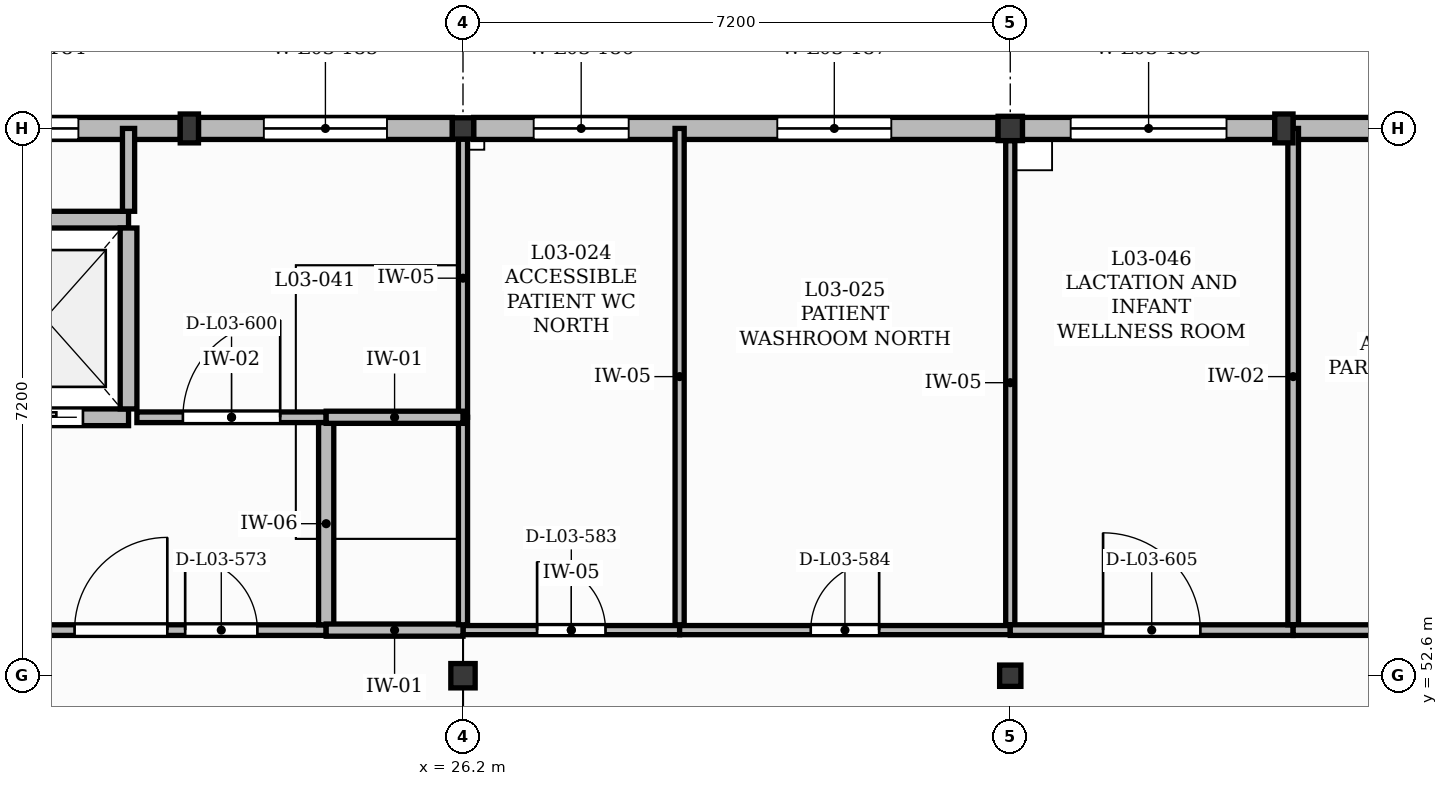
"""IFC4 building model, lengths in metres.
Left out: names, types, materials, properties, quantities, classifications, styles, units other than length and angle.
Written with IfcOpenShell. Run it as: python <this file> out.ifc"""

import sys

from ifc_helpers import new_model, si_unit, direction, frame, frame_2d, origin, origin_2d, place, context, subcontext, project, spatial, rectangle, extrude, element, fill, save


model = new_model("IFC4")
c1 = context("Model", 3, precision=1e-05, world=origin(), true_north=direction((0.0, 1.0)))
c2 = subcontext(c1, "Body", "Model", "MODEL_VIEW")
j1 = project(units=[si_unit("LENGTHUNIT", "METRE"), si_unit("PLANEANGLEUNIT", "RADIAN")], contexts=[c1])
p1 = place(None, origin())
s1 = spatial("IfcSite", under=j1, at=p1, CompositionType="ELEMENT")
p2 = place(p1, origin())
s2 = spatial("IfcBuilding", under=s1, at=p2, CompositionType="ELEMENT")
p3 = place(p2, frame((0.0, 0.0, 13.2)))
s3 = spatial("IfcBuildingStorey", under=s2, at=p3, CompositionType="ELEMENT", Elevation=13.2)
p4 = place(p3, frame((26.2, 52.6, 0.0), z_axis=(0.0, 0.0, 1.0), x_axis=(1.0, 0.0, 0.0)))
e1 = element("IfcColumn", 1, at=p4, inside=s3, PredefinedType="COLUMN", context=c2, shape_type="SweptSolid", body=[
    extrude(rectangle(XDim=0.32, YDim=0.32, at=origin_2d()), origin(), (0.0, 0.0, 1.0), 4.01),
])
for number, where, z_axis, x_axis in (
    (2, (26.2, 59.8, 0.0), (0.0, 0.0, 1.0), (1.0, 0.0, 0.0)),
    (3, (33.4, 52.6, 0.0), (0.0, 0.0, 1.0), (1.0, 0.0, 0.0)),
):
    element("IfcColumn", number, at=place(p3, frame(where, z_axis=z_axis, x_axis=x_axis)), inside=s3, PredefinedType="COLUMN", context=c2, shape_type="SweptSolid", body=[
        extrude(rectangle(XDim=0.28, YDim=0.28, at=origin_2d()), origin(), (0.0, 0.0, 1.0), 4.01),
    ])
p5 = place(p3, frame((33.4, 59.8, 0.0), z_axis=(0.0, 0.0, 1.0), x_axis=(1.0, 0.0, 0.0)))
e4 = element("IfcColumn", 4, at=p5, inside=s3, PredefinedType="COLUMN", context=c2, shape_type="SweptSolid", body=[
    extrude(rectangle(XDim=0.32, YDim=0.32, at=origin_2d()), origin(), (0.0, 0.0, 1.0), 4.01),
])
for number, where, z_axis, x_axis in (
    (5, (22.6, 59.8, 0.0), (0.0, 0.0, 1.0), (1.0, 0.0, 0.0)),
    (6, (37.0, 59.8, 0.0), (0.0, 0.0, 1.0), (1.0, 0.0, 0.0)),
):
    element("IfcColumn", number, at=place(p3, frame(where, z_axis=z_axis, x_axis=x_axis)), inside=s3, PredefinedType="PILASTER", context=c2, shape_type="SweptSolid", body=[
        extrude(rectangle(XDim=0.24, YDim=0.38, at=origin_2d()), origin(), (0.0, 0.0, 1.0), 4.01),
    ])
p6 = place(p3, frame((19.16, 59.8, 0.0), z_axis=(0.0, 0.0, 1.0), x_axis=(1.0, 0.0, 0.0)))
e7 = element("IfcWall", 7, at=p6, inside=s3, PredefinedType="SOLIDWALL", context=c2, shape_type="SweptSolid", body=[
    extrude(rectangle(XDim=3.32, YDim=0.29, at=frame_2d((1.66, 0.0))), origin(), (0.0, 0.0, 1.0), 3.55),
])
p7 = place(p6, frame((0.78, 0.0, 1.0)))
e8 = element("IfcOpeningElement", 8, at=p7, cuts=e7, PredefinedType="OPENING", context=c2, shape_type="SweptSolid", body=[
    extrude(rectangle(XDim=1.2, YDim=1.95, at=frame_2d((0.6, 0.975))), frame((0.0, 0.155, 0.0), z_axis=(0.0, -1.0, 0.0), x_axis=(1.0, 0.0, 0.0)), (0.0, 0.0, 1.0), 0.31),
])
p8 = place(p3, frame((22.72, 59.8, 0.0), z_axis=(0.0, 0.0, 1.0), x_axis=(1.0, 0.0, 0.0)))
e9 = element("IfcWall", 9, at=p8, inside=s3, PredefinedType="SOLIDWALL", context=c2, shape_type="SweptSolid", body=[
    extrude(rectangle(XDim=3.34, YDim=0.29, at=frame_2d((1.67, 0.0))), origin(), (0.0, 0.0, 1.0), 3.55),
])
p9 = place(p8, frame((0.86, 0.0, 1.0)))
e10 = element("IfcOpeningElement", 10, at=p9, cuts=e9, PredefinedType="OPENING", context=c2, shape_type="SweptSolid", body=[
    extrude(rectangle(XDim=1.62, YDim=1.95, at=frame_2d((0.81, 0.975))), frame((0.0, 0.155, 0.0), z_axis=(0.0, -1.0, 0.0), x_axis=(1.0, 0.0, 0.0)), (0.0, 0.0, 1.0), 0.31),
])
p10 = place(p3, frame((26.34, 59.8, 0.0), z_axis=(0.0, 0.0, 1.0), x_axis=(1.0, 0.0, 0.0)))
e11 = element("IfcWall", 11, at=p10, inside=s3, PredefinedType="SOLIDWALL", context=c2, shape_type="SweptSolid", body=[
    extrude(rectangle(XDim=6.9, YDim=0.29, at=frame_2d((3.45, 0.0))), origin(), (0.0, 0.0, 1.0), 3.55),
])
p11 = place(p10, frame((0.79, 0.0, 1.35)))
e12 = element("IfcOpeningElement", 12, at=p11, cuts=e11, PredefinedType="OPENING", context=c2, shape_type="SweptSolid", body=[
    extrude(rectangle(XDim=1.25, YDim=1.4, at=frame_2d((0.625, 0.7))), frame((0.0, 0.155, 0.0), z_axis=(0.0, -1.0, 0.0), x_axis=(1.0, 0.0, 0.0)), (0.0, 0.0, 1.0), 0.31),
])
p12 = place(p10, frame((3.995, 0.0, 1.5)))
e13 = element("IfcOpeningElement", 13, at=p12, cuts=e11, PredefinedType="OPENING", context=c2, shape_type="SweptSolid", body=[
    extrude(rectangle(XDim=1.5, YDim=1.25, at=frame_2d((0.75, 0.625))), frame((0.0, 0.155, 0.0), z_axis=(0.0, -1.0, 0.0), x_axis=(1.0, 0.0, 0.0)), (0.0, 0.0, 1.0), 0.31),
])
p13 = place(p3, frame((33.56, 59.8, 0.0), z_axis=(0.0, 0.0, 1.0), x_axis=(1.0, 0.0, 0.0)))
e14 = element("IfcWall", 14, at=p13, inside=s3, PredefinedType="SOLIDWALL", context=c2, shape_type="SweptSolid", body=[
    extrude(rectangle(XDim=3.32, YDim=0.29, at=frame_2d((1.66, 0.0))), origin(), (0.0, 0.0, 1.0), 3.55),
])
p14 = place(p13, frame((0.635, 0.0, 1.0)))
e15 = element("IfcOpeningElement", 15, at=p14, cuts=e14, PredefinedType="OPENING", context=c2, shape_type="SweptSolid", body=[
    extrude(rectangle(XDim=2.05, YDim=1.95, at=frame_2d((1.025, 0.975))), frame((0.0, 0.155, 0.0), z_axis=(0.0, -1.0, 0.0), x_axis=(1.0, 0.0, 0.0)), (0.0, 0.0, 1.0), 0.31),
])
p15 = place(p3, frame((37.12, 59.8, 0.0), z_axis=(0.0, 0.0, 1.0), x_axis=(1.0, 0.0, 0.0)))
e16 = element("IfcWall", 16, at=p15, inside=s3, PredefinedType="SOLIDWALL", context=c2, shape_type="SweptSolid", body=[
    extrude(rectangle(XDim=3.34, YDim=0.29, at=frame_2d((1.67, 0.0))), origin(), (0.0, 0.0, 1.0), 3.55),
])
p16 = place(p15, frame((1.12, 0.0, 1.0)))
e17 = element("IfcOpeningElement", 17, at=p16, cuts=e16, PredefinedType="OPENING", context=c2, shape_type="SweptSolid", body=[
    extrude(rectangle(XDim=1.1, YDim=1.8, at=frame_2d((0.55, 0.9))), frame((0.0, 0.155, 0.0), z_axis=(0.0, -1.0, 0.0), x_axis=(1.0, 0.0, 0.0)), (0.0, 0.0, 1.0), 0.31),
])
p17 = place(p3, frame((19.6, 56.0, 0.0), z_axis=(0.0, 0.0, 1.0), x_axis=(1.0, 0.0, 0.0)))
e18 = element("IfcWall", 18, at=p17, inside=s3, PredefinedType="SOLIDWALL", context=c2, shape_type="SweptSolid", body=[
    extrude(rectangle(XDim=2.2, YDim=0.22, at=frame_2d((1.1, 0.0))), origin(), (0.0, 0.0, 1.0), 3.95),
])
p18 = place(p17, frame((0.6, 0.0, 0.0)))
e19 = element("IfcOpeningElement", 19, at=p18, cuts=e18, PredefinedType="OPENING", context=c2, shape_type="SweptSolid", body=[
    extrude(rectangle(XDim=1.0, YDim=2.15, at=frame_2d((0.5, 1.075))), frame((0.0, 0.12, 0.0), z_axis=(0.0, -1.0, 0.0), x_axis=(1.0, 0.0, 0.0)), (0.0, 0.0, 1.0), 0.24),
])
p19 = place(p3, frame((19.6, 58.6, 0.0), z_axis=(0.0, 0.0, 1.0), x_axis=(1.0, 0.0, 0.0)))
e20 = element("IfcWall", 20, at=p19, inside=s3, PredefinedType="SOLIDWALL", context=c2, shape_type="SweptSolid", body=[
    extrude(rectangle(XDim=2.2, YDim=0.22, at=frame_2d((1.1, 0.0))), origin(), (0.0, 0.0, 1.0), 3.95),
])
p20 = place(p3, frame((21.8, 56.11, 0.0), z_axis=(0.0, 0.0, 1.0), x_axis=(0.0, 1.0, 0.0)))
e21 = element("IfcWall", 21, at=p20, inside=s3, PredefinedType="SOLIDWALL", context=c2, shape_type="SweptSolid", body=[
    extrude(rectangle(XDim=2.38, YDim=0.22, at=frame_2d((1.19, 0.0))), origin(), (0.0, 0.0, 1.0), 3.95),
])
p21 = place(p3, frame((19.0, 53.2, 0.0), z_axis=(0.0, 0.0, 1.0), x_axis=(1.0, 0.0, 0.0)))
e22 = element("IfcWall", 22, at=p21, inside=s3, PredefinedType="PARTITIONING", context=c2, shape_type="SweptSolid", body=[
    extrude(rectangle(XDim=5.4, YDim=0.14, at=frame_2d((2.7, 0.0))), origin(), (0.0, 0.0, 1.0), 3.96),
])
p22 = place(p21, frame((2.09, 0.0, 0.0)))
e23 = element("IfcOpeningElement", 23, at=p22, cuts=e22, PredefinedType="OPENING", context=c2, shape_type="SweptSolid", body=[
    extrude(rectangle(XDim=1.22, YDim=2.1, at=frame_2d((0.61, 1.05))), frame((0.0, 0.08, 0.0), z_axis=(0.0, -1.0, 0.0), x_axis=(1.0, 0.0, 0.0)), (0.0, 0.0, 1.0), 0.16),
])
p23 = place(p21, frame((3.545, 0.0, 0.0)))
e24 = element("IfcOpeningElement", 24, at=p23, cuts=e22, PredefinedType="OPENING", context=c2, shape_type="SweptSolid", body=[
    extrude(rectangle(XDim=0.95, YDim=2.1, at=frame_2d((0.475, 1.05))), frame((0.0, 0.08, 0.0), z_axis=(0.0, -1.0, 0.0), x_axis=(1.0, 0.0, 0.0)), (0.0, 0.0, 1.0), 0.16),
])
p24 = place(p3, frame((21.91, 56.0, 0.0), z_axis=(0.0, 0.0, 1.0), x_axis=(1.0, 0.0, 0.0)))
e25 = element("IfcWall", 25, at=p24, inside=s3, PredefinedType="PARTITIONING", context=c2, shape_type="SweptSolid", body=[
    extrude(rectangle(XDim=2.49, YDim=0.14, at=frame_2d((1.245, 0.0))), origin(), (0.0, 0.0, 1.0), 3.96),
])
p25 = place(p24, frame((0.605, 0.0, 0.0)))
e26 = element("IfcOpeningElement", 26, at=p25, cuts=e25, PredefinedType="OPENING", context=c2, shape_type="SweptSolid", body=[
    extrude(rectangle(XDim=1.28, YDim=2.2, at=frame_2d((0.64, 1.1))), frame((0.0, 0.08, 0.0), z_axis=(0.0, -1.0, 0.0), x_axis=(1.0, 0.0, 0.0)), (0.0, 0.0, 1.0), 0.16),
])
p26 = place(p3, frame((26.2, 53.2, 0.0), z_axis=(0.0, 0.0, 1.0), x_axis=(1.0, 0.0, 0.0)))
e27 = element("IfcWall", 27, at=p26, inside=s3, PredefinedType="PLUMBINGWALL", context=c2, shape_type="SweptSolid", body=[
    extrude(rectangle(XDim=2.85, YDim=0.12, at=frame_2d((1.425, 0.0))), origin(), (0.0, 0.0, 1.0), 3.96),
])
p27 = place(p26, frame((0.975, 0.0, 0.0)))
e28 = element("IfcOpeningElement", 28, at=p27, cuts=e27, PredefinedType="OPENING", context=c2, shape_type="SweptSolid", body=[
    extrude(rectangle(XDim=0.9, YDim=2.1, at=frame_2d((0.45, 1.05))), frame((0.0, 0.07, 0.0), z_axis=(0.0, -1.0, 0.0), x_axis=(1.0, 0.0, 0.0)), (0.0, 0.0, 1.0), 0.14),
])
p28 = place(p3, frame((26.2, 56.0, 0.0), z_axis=(0.0, 0.0, 1.0), x_axis=(0.0, 1.0, 0.0)))
e29 = element("IfcWall", 29, at=p28, inside=s3, PredefinedType="PLUMBINGWALL", context=c2, shape_type="SweptSolid", body=[
    extrude(rectangle(XDim=3.66, YDim=0.12, at=frame_2d((1.83, 0.0))), origin(), (0.0, 0.0, 1.0), 3.49),
])
p29 = place(p3, frame((29.05, 53.27, 0.0), z_axis=(0.0, 0.0, 1.0), x_axis=(0.0, 1.0, 0.0)))
e30 = element("IfcWall", 30, at=p29, inside=s3, PredefinedType="PLUMBINGWALL", context=c2, shape_type="SweptSolid", body=[
    extrude(rectangle(XDim=6.53, YDim=0.12, at=frame_2d((3.265, 0.0))), origin(), (0.0, 0.0, 1.0), 3.96),
])
p30 = place(p3, frame((29.05, 53.2, 0.0), z_axis=(0.0, 0.0, 1.0), x_axis=(1.0, 0.0, 0.0)))
e31 = element("IfcWall", 31, at=p30, inside=s3, PredefinedType="PLUMBINGWALL", context=c2, shape_type="SweptSolid", body=[
    extrude(rectangle(XDim=4.35, YDim=0.12, at=frame_2d((2.175, 0.0))), origin(), (0.0, 0.0, 1.0), 3.96),
])
p31 = place(p30, frame((1.725, 0.0, 0.0)))
e32 = element("IfcOpeningElement", 32, at=p31, cuts=e31, PredefinedType="OPENING", context=c2, shape_type="SweptSolid", body=[
    extrude(rectangle(XDim=0.9, YDim=2.1, at=frame_2d((0.45, 1.05))), frame((0.0, 0.07, 0.0), z_axis=(0.0, -1.0, 0.0), x_axis=(1.0, 0.0, 0.0)), (0.0, 0.0, 1.0), 0.14),
])
p32 = place(p3, frame((33.4, 53.27, 0.0), z_axis=(0.0, 0.0, 1.0), x_axis=(0.0, 1.0, 0.0)))
e33 = element("IfcWall", 33, at=p32, inside=s3, PredefinedType="PLUMBINGWALL", context=c2, shape_type="SweptSolid", body=[
    extrude(rectangle(XDim=6.37, YDim=0.12, at=frame_2d((3.185, 0.0))), origin(), (0.0, 0.0, 1.0), 3.49),
])
p33 = place(p3, frame((33.4, 53.2, 0.0), z_axis=(0.0, 0.0, 1.0), x_axis=(1.0, 0.0, 0.0)))
e34 = element("IfcWall", 34, at=p33, inside=s3, PredefinedType="PARTITIONING", context=c2, shape_type="SweptSolid", body=[
    extrude(rectangle(XDim=3.722, YDim=0.14, at=frame_2d((1.861, 0.0))), origin(), (0.0, 0.0, 1.0), 3.96),
])
p34 = place(p33, frame((1.221, 0.0, 0.0)))
e35 = element("IfcOpeningElement", 35, at=p34, cuts=e34, PredefinedType="OPENING", context=c2, shape_type="SweptSolid", body=[
    extrude(rectangle(XDim=1.28, YDim=2.2, at=frame_2d((0.64, 1.1))), frame((0.0, 0.08, 0.0), z_axis=(0.0, -1.0, 0.0), x_axis=(1.0, 0.0, 0.0)), (0.0, 0.0, 1.0), 0.16),
])
p35 = place(p3, frame((37.122, 53.27, 0.0), z_axis=(0.0, 0.0, 1.0), x_axis=(0.0, 1.0, 0.0)))
e36 = element("IfcWall", 36, at=p35, inside=s3, PredefinedType="PARTITIONING", context=c2, shape_type="SweptSolid", body=[
    extrude(rectangle(XDim=6.53, YDim=0.14, at=frame_2d((3.265, 0.0))), origin(), (0.0, 0.0, 1.0), 3.96),
])
p36 = place(p3, frame((37.122, 53.2, 0.0), z_axis=(0.0, 0.0, 1.0), x_axis=(1.0, 0.0, 0.0)))
e37 = element("IfcWall", 37, at=p36, inside=s3, PredefinedType="PARTITIONING", context=c2, shape_type="SweptSolid", body=[
    extrude(rectangle(XDim=3.478, YDim=0.14, at=frame_2d((1.739, 0.0))), origin(), (0.0, 0.0, 1.0), 3.96),
])
p37 = place(p36, frame((1.249, 0.0, 0.0)))
e38 = element("IfcOpeningElement", 38, at=p37, cuts=e37, PredefinedType="OPENING", context=c2, shape_type="SweptSolid", body=[
    extrude(rectangle(XDim=0.98, YDim=2.15, at=frame_2d((0.49, 1.075))), frame((0.0, 0.08, 0.0), z_axis=(0.0, -1.0, 0.0), x_axis=(1.0, 0.0, 0.0)), (0.0, 0.0, 1.0), 0.16),
])
p38 = place(p3, frame((24.4, 53.27, 0.0), z_axis=(0.0, 0.0, 1.0), x_axis=(0.0, 1.0, 0.0)))
e39 = element("IfcWall", 39, at=p38, inside=s3, PredefinedType="PARTITIONING", context=c2, shape_type="SweptSolid", body=[
    extrude(rectangle(XDim=2.66, YDim=0.2, at=frame_2d((1.33, 0.0))), origin(), (0.0, 0.0, 1.0), 3.96),
])
p39 = place(p3, frame((26.2, 53.2, 0.0), z_axis=(0.0, 0.0, 1.0), x_axis=(-1.0, 0.0, 0.0)))
e40 = element("IfcWall", 40, at=p39, inside=s3, PredefinedType="PARTITIONING", context=c2, shape_type="SweptSolid", body=[
    extrude(rectangle(XDim=1.8, YDim=0.16, at=frame_2d((0.9, 0.0))), origin(), (0.0, 0.0, 1.0), 3.96),
])
p40 = place(p3, frame((26.2, 53.27, 0.0), z_axis=(0.0, 0.0, 1.0), x_axis=(0.0, 1.0, 0.0)))
e41 = element("IfcWall", 41, at=p40, inside=s3, PredefinedType="PLUMBINGWALL", context=c2, shape_type="SweptSolid", body=[
    extrude(rectangle(XDim=2.73, YDim=0.12, at=frame_2d((1.365, 0.0))), origin(), (0.0, 0.0, 1.0), 3.49),
])
p41 = place(p3, frame((24.4, 56.0, 0.0), z_axis=(0.0, 0.0, 1.0), x_axis=(1.0, 0.0, 0.0)))
e42 = element("IfcWall", 42, at=p41, inside=s3, PredefinedType="PARTITIONING", context=c2, shape_type="SweptSolid", body=[
    extrude(rectangle(XDim=1.8, YDim=0.16, at=frame_2d((0.9, 0.0))), origin(), (0.0, 0.0, 1.0), 3.96),
])
p42 = place(p3, frame((21.8, 58.71, 0.0), z_axis=(0.0, 0.0, 1.0), x_axis=(0.0, 1.0, 0.0)))
e43 = element("IfcWall", 43, at=p42, inside=s3, PredefinedType="PARTITIONING", context=c2, shape_type="SweptSolid", body=[
    extrude(rectangle(XDim=1.09, YDim=0.16, at=frame_2d((0.545, 0.0))), origin(), (0.0, 0.0, 1.0), 3.96),
])
p43 = place(p7, origin())
e44 = element("IfcWindow", 44, at=p43, inside=s3, PartitioningType="SINGLE_PANEL", PredefinedType="WINDOW", context=c2, shape_type="SweptSolid", body=[
    extrude(rectangle(XDim=1.2, YDim=1.95, at=frame_2d((0.6, 0.975))), frame((0.0, 0.03, 0.0), z_axis=(0.0, -1.0, 0.0), x_axis=(1.0, 0.0, 0.0)), (0.0, 0.0, 1.0), 0.06),
])
fill(e8, e44)
p44 = place(p9, origin())
e45 = element("IfcWindow", 45, at=p44, inside=s3, PartitioningType="DOUBLE_PANEL_VERTICAL", PredefinedType="WINDOW", context=c2, shape_type="SweptSolid", body=[
    extrude(rectangle(XDim=1.62, YDim=1.95, at=frame_2d((0.81, 0.975))), frame((0.0, 0.03, 0.0), z_axis=(0.0, -1.0, 0.0), x_axis=(1.0, 0.0, 0.0)), (0.0, 0.0, 1.0), 0.06),
])
fill(e10, e45)
p45 = place(p11, origin())
e46 = element("IfcWindow", 46, at=p45, inside=s3, PartitioningType="SINGLE_PANEL", PredefinedType="WINDOW", context=c2, shape_type="SweptSolid", body=[
    extrude(rectangle(XDim=1.25, YDim=1.4, at=frame_2d((0.625, 0.7))), frame((0.0, 0.03, 0.0), z_axis=(0.0, -1.0, 0.0), x_axis=(1.0, 0.0, 0.0)), (0.0, 0.0, 1.0), 0.06),
])
fill(e12, e46)
p46 = place(p12, origin())
e47 = element("IfcWindow", 47, at=p46, inside=s3, PartitioningType="DOUBLE_PANEL_VERTICAL", PredefinedType="WINDOW", context=c2, shape_type="SweptSolid", body=[
    extrude(rectangle(XDim=1.5, YDim=1.25, at=frame_2d((0.75, 0.625))), frame((0.0, 0.03, 0.0), z_axis=(0.0, -1.0, 0.0), x_axis=(1.0, 0.0, 0.0)), (0.0, 0.0, 1.0), 0.06),
])
fill(e13, e47)
p47 = place(p14, origin())
e48 = element("IfcWindow", 48, at=p47, inside=s3, PartitioningType="DOUBLE_PANEL_VERTICAL", PredefinedType="WINDOW", context=c2, shape_type="SweptSolid", body=[
    extrude(rectangle(XDim=2.05, YDim=1.95, at=frame_2d((1.025, 0.975))), frame((0.0, 0.03, 0.0), z_axis=(0.0, -1.0, 0.0), x_axis=(1.0, 0.0, 0.0)), (0.0, 0.0, 1.0), 0.06),
])
fill(e15, e48)
p48 = place(p18, origin())
e49 = element("IfcDoor", 49, at=p48, inside=s3, OperationType="SLIDING_TO_LEFT", PredefinedType="DOOR", context=c2, shape_type="SweptSolid", body=[
    extrude(rectangle(XDim=1.0, YDim=2.15, at=frame_2d((0.5, 1.075))), frame((0.0, 0.025, 0.0), z_axis=(0.0, -1.0, 0.0), x_axis=(1.0, 0.0, 0.0)), (0.0, 0.0, 1.0), 0.05),
])
fill(e19, e49)
p49 = place(p22, origin())
e50 = element("IfcDoor", 50, at=p49, inside=s3, OperationType="SINGLE_SWING_RIGHT", PredefinedType="DOOR", context=c2, shape_type="SweptSolid", body=[
    extrude(rectangle(XDim=1.22, YDim=2.1, at=frame_2d((0.61, 1.05))), frame((0.0, 0.025, 0.0), z_axis=(0.0, -1.0, 0.0), x_axis=(1.0, 0.0, 0.0)), (0.0, 0.0, 1.0), 0.05),
])
fill(e23, e50)
p50 = place(p23, origin())
e51 = element("IfcDoor", 51, at=p50, inside=s3, OperationType="SINGLE_SWING_LEFT", PredefinedType="DOOR", context=c2, shape_type="SweptSolid", body=[
    extrude(rectangle(XDim=0.95, YDim=2.1, at=frame_2d((0.475, 1.05))), frame((0.0, 0.025, 0.0), z_axis=(0.0, -1.0, 0.0), x_axis=(1.0, 0.0, 0.0)), (0.0, 0.0, 1.0), 0.05),
])
fill(e24, e51)
p51 = place(p27, origin())
e52 = element("IfcDoor", 52, at=p51, inside=s3, OperationType="SINGLE_SWING_LEFT", PredefinedType="DOOR", context=c2, shape_type="SweptSolid", body=[
    extrude(rectangle(XDim=0.9, YDim=2.1, at=frame_2d((0.45, 1.05))), frame((0.0, 0.025, 0.0), z_axis=(0.0, -1.0, 0.0), x_axis=(1.0, 0.0, 0.0)), (0.0, 0.0, 1.0), 0.05),
])
fill(e28, e52)
p52 = place(p31, origin())
e53 = element("IfcDoor", 53, at=p52, inside=s3, OperationType="SINGLE_SWING_RIGHT", PredefinedType="DOOR", context=c2, shape_type="SweptSolid", body=[
    extrude(rectangle(XDim=0.9, YDim=2.1, at=frame_2d((0.45, 1.05))), frame((0.0, 0.025, 0.0), z_axis=(0.0, -1.0, 0.0), x_axis=(1.0, 0.0, 0.0)), (0.0, 0.0, 1.0), 0.05),
])
fill(e32, e53)
p53 = place(p25, origin())
e54 = element("IfcDoor", 54, at=p53, inside=s3, OperationType="SINGLE_SWING_RIGHT", PredefinedType="DOOR", context=c2, shape_type="SweptSolid", body=[
    extrude(rectangle(XDim=1.28, YDim=2.2, at=frame_2d((0.64, 1.1))), frame((0.0, 0.025, 0.0), z_axis=(0.0, -1.0, 0.0), x_axis=(1.0, 0.0, 0.0)), (0.0, 0.0, 1.0), 0.05),
])
fill(e26, e54)
p54 = place(p34, origin())
e55 = element("IfcDoor", 55, at=p54, inside=s3, OperationType="SINGLE_SWING_LEFT", PredefinedType="DOOR", context=c2, shape_type="SweptSolid", body=[
    extrude(rectangle(XDim=1.28, YDim=2.2, at=frame_2d((0.64, 1.1))), frame((0.0, 0.025, 0.0), z_axis=(0.0, -1.0, 0.0), x_axis=(1.0, 0.0, 0.0)), (0.0, 0.0, 1.0), 0.05),
])
fill(e35, e55)
save(model, sys.argv[1])
